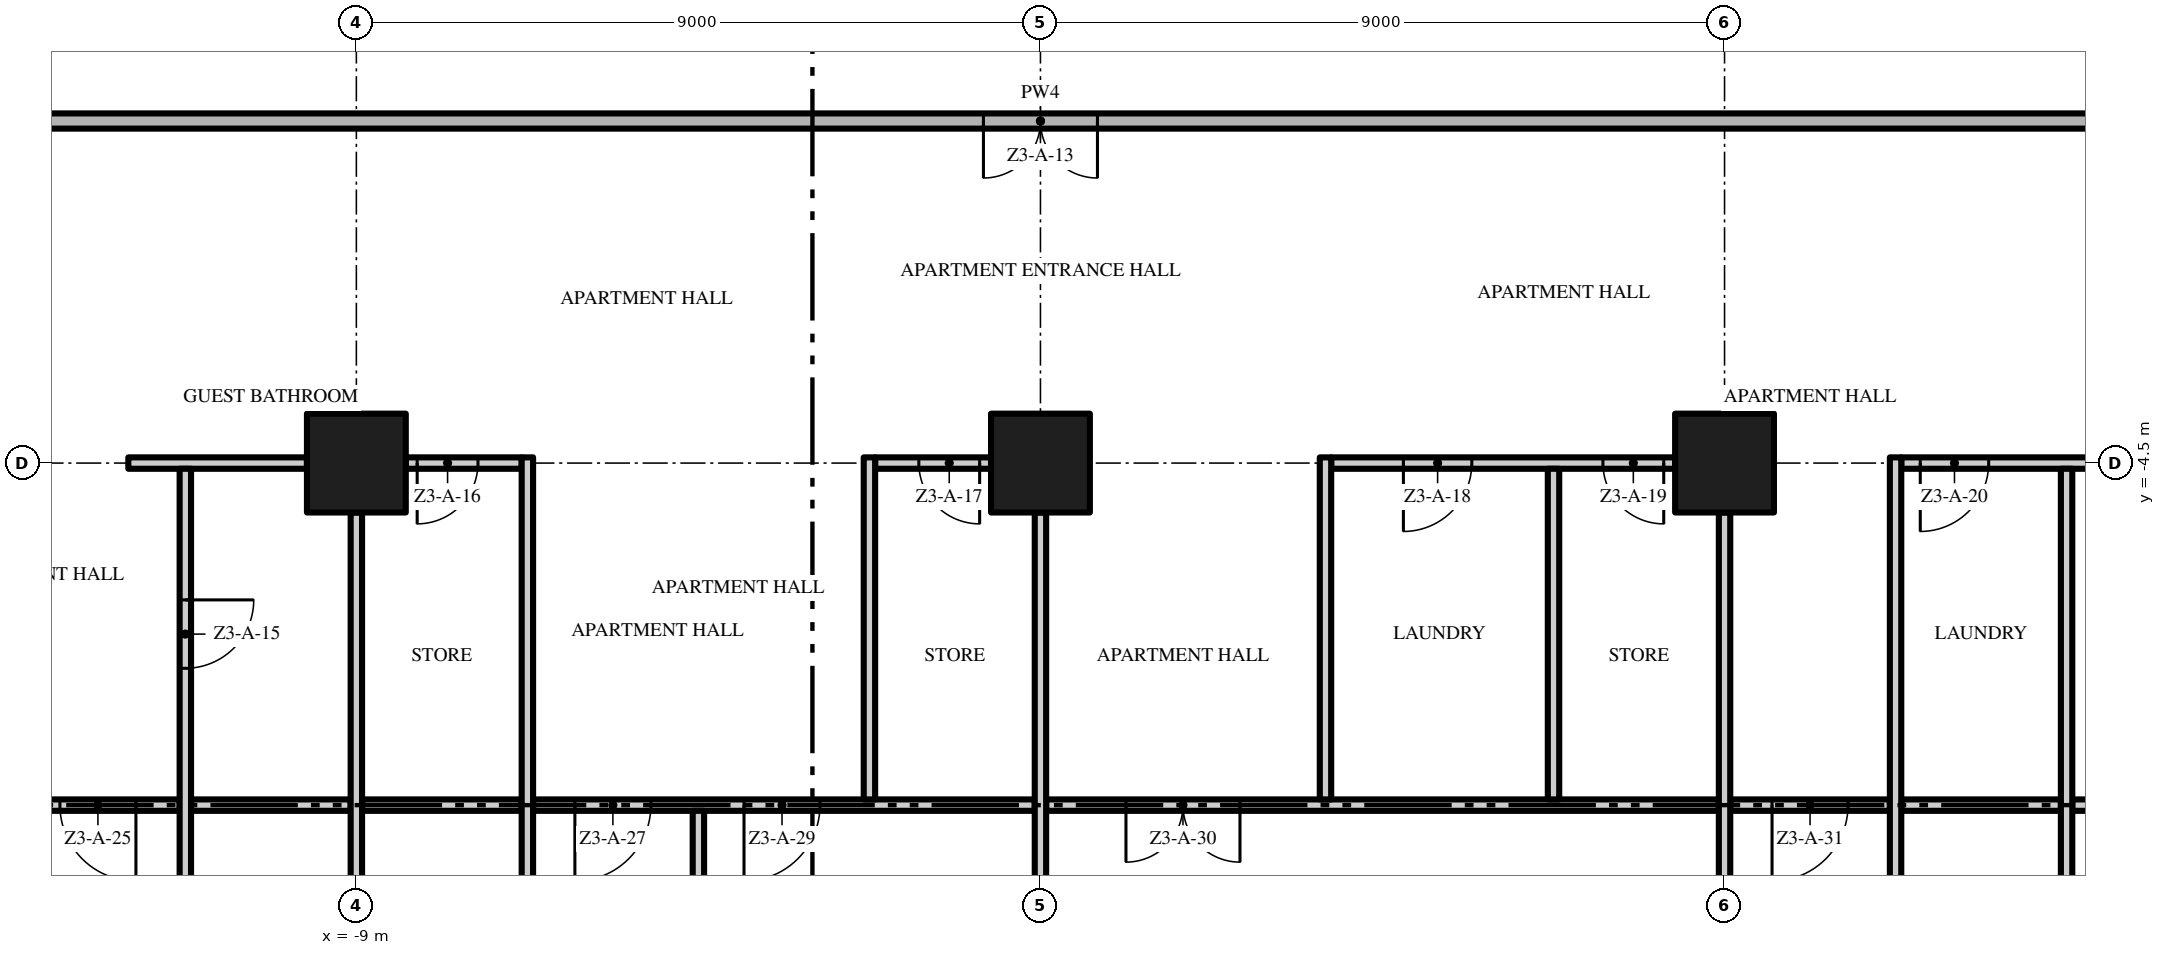
"""IFC4 building model, lengths in metres.
Left out: names, types, materials, properties, quantities, classifications, styles, units other than length and angle.
Written with IfcOpenShell. Run it as: python <this file> out.ifc"""

import sys

from ifc_helpers import new_model, si_unit, direction, frame, frame_2d, origin, origin_2d, place, context, subcontext, project, spatial, rectangle, extrude, element, fill, save


model = new_model("IFC4")
c1 = context("Model", 3, precision=1e-05, world=origin(), true_north=direction((0.0, 1.0)))
c2 = subcontext(c1, "Body", "Model", "MODEL_VIEW")
j1 = project(units=[si_unit("LENGTHUNIT", "METRE"), si_unit("PLANEANGLEUNIT", "RADIAN")], contexts=[c1])
p1 = place(None, origin())
s1 = spatial("IfcSite", under=j1, at=p1, CompositionType="ELEMENT")
p2 = place(p1, origin())
s2 = spatial("IfcBuilding", under=s1, at=p2, CompositionType="ELEMENT")
p3 = place(p2, frame((0.0, 0.0, 128.8)))
s3 = spatial("IfcBuildingStorey", under=s2, at=p3, CompositionType="ELEMENT", Elevation=128.8)
for number, where, z_axis, x_axis in (
    (1, (-9.0, -4.5, 0.0), (0.0, 0.0, 1.0), (1.0, 0.0, 0.0)),
    (2, (0.0, -4.5, 0.0), (0.0, 0.0, 1.0), (1.0, 0.0, 0.0)),
    (3, (9.0, -4.5, 0.0), (0.0, 0.0, 1.0), (1.0, 0.0, 0.0)),
):
    element("IfcColumn", number, at=place(p3, frame(where, z_axis=z_axis, x_axis=x_axis)), inside=s3, PredefinedType="COLUMN", context=c2, shape_type="SweptSolid", body=[
        extrude(rectangle(XDim=1.3, YDim=1.3, at=origin_2d()), origin(), (0.0, 0.0, 1.0), 3.5),
    ])
p4 = place(p3, frame((-11.325, -9.0, 0.0), z_axis=(0.0, 0.0, 1.0), x_axis=(-1.0, 0.0, 0.0)))
e4 = element("IfcWall", 4, at=p4, inside=s3, PredefinedType="PARTITIONING", context=c2, shape_type="SweptSolid", body=[
    extrude(rectangle(XDim=10.875, YDim=0.15, at=frame_2d((5.438, 0.0))), origin(), (0.0, 0.0, 1.0), 3.5),
])
p5 = place(p4, frame((3.175, 0.0, 0.0)))
e5 = element("IfcOpeningElement", 5, at=p5, cuts=e4, PredefinedType="OPENING", context=c2, shape_type="SweptSolid", body=[
    extrude(rectangle(XDim=1.8, YDim=2.4, at=frame_2d((0.9, 1.2))), frame((0.0, 0.085, 0.0), z_axis=(0.0, -1.0, 0.0), x_axis=(1.0, 0.0, 0.0)), (0.0, 0.0, 1.0), 0.17),
])
p6 = place(p4, frame((0.575, 0.0, 0.0)))
e6 = element("IfcOpeningElement", 6, at=p6, cuts=e4, PredefinedType="OPENING", context=c2, shape_type="SweptSolid", body=[
    extrude(rectangle(XDim=1.0, YDim=2.4, at=frame_2d((0.5, 1.2))), frame((0.0, 0.085, 0.0), z_axis=(0.0, -1.0, 0.0), x_axis=(1.0, 0.0, 0.0)), (0.0, 0.0, 1.0), 0.17),
])
for number, where, z_axis, x_axis in (
    (7, (-11.175, -9.0, 0.0), (0.0, 0.0, 1.0), (1.0, 0.0, 0.0)),
    (8, (-8.925, -9.0, 0.0), (0.0, 0.0, 1.0), (1.0, 0.0, 0.0)),
):
    element("IfcWall", number, at=place(p3, frame(where, z_axis=z_axis, x_axis=x_axis)), inside=s3, PredefinedType="PARTITIONING", context=c2, shape_type="SweptSolid", body=[
        extrude(rectangle(XDim=2.1, YDim=0.15, at=frame_2d((1.05, 0.0))), origin(), (0.0, 0.0, 1.0), 3.5),
    ])
p7 = place(p3, frame((-0.075, -9.0, 0.0), z_axis=(0.0, 0.0, 1.0), x_axis=(-1.0, 0.0, 0.0)))
e9 = element("IfcWall", 9, at=p7, inside=s3, PredefinedType="PARTITIONING", context=c2, shape_type="SweptSolid", body=[
    extrude(rectangle(XDim=6.6, YDim=0.15, at=frame_2d((3.3, 0.0))), origin(), (0.0, 0.0, 1.0), 3.5),
])
p8 = place(p7, frame((5.05, 0.0, 0.0)))
e10 = element("IfcOpeningElement", 10, at=p8, cuts=e9, PredefinedType="OPENING", context=c2, shape_type="SweptSolid", body=[
    extrude(rectangle(XDim=1.0, YDim=2.4, at=frame_2d((0.5, 1.2))), frame((0.0, 0.085, 0.0), z_axis=(0.0, -1.0, 0.0), x_axis=(1.0, 0.0, 0.0)), (0.0, 0.0, 1.0), 0.17),
])
p9 = place(p7, frame((2.825, 0.0, 0.0)))
e11 = element("IfcOpeningElement", 11, at=p9, cuts=e9, PredefinedType="OPENING", context=c2, shape_type="SweptSolid", body=[
    extrude(rectangle(XDim=1.0, YDim=2.4, at=frame_2d((0.5, 1.2))), frame((0.0, 0.085, 0.0), z_axis=(0.0, -1.0, 0.0), x_axis=(1.0, 0.0, 0.0)), (0.0, 0.0, 1.0), 0.17),
])
p10 = place(p3, frame((8.925, -9.0, 0.0), z_axis=(0.0, 0.0, 1.0), x_axis=(-1.0, 0.0, 0.0)))
e12 = element("IfcWall", 12, at=p10, inside=s3, PredefinedType="PARTITIONING", context=c2, shape_type="SweptSolid", body=[
    extrude(rectangle(XDim=8.85, YDim=0.15, at=frame_2d((4.425, 0.0))), origin(), (0.0, 0.0, 1.0), 3.5),
])
p11 = place(p10, frame((6.3, 0.0, 0.0)))
e13 = element("IfcOpeningElement", 13, at=p11, cuts=e12, PredefinedType="OPENING", context=c2, shape_type="SweptSolid", body=[
    extrude(rectangle(XDim=1.5, YDim=2.4, at=frame_2d((0.75, 1.2))), frame((0.0, 0.085, 0.0), z_axis=(0.0, -1.0, 0.0), x_axis=(1.0, 0.0, 0.0)), (0.0, 0.0, 1.0), 0.17),
])
p12 = place(p3, frame((11.175, -9.0, 0.0), z_axis=(0.0, 0.0, 1.0), x_axis=(-1.0, 0.0, 0.0)))
e14 = element("IfcWall", 14, at=p12, inside=s3, PredefinedType="PARTITIONING", context=c2, shape_type="SweptSolid", body=[
    extrude(rectangle(XDim=2.1, YDim=0.15, at=frame_2d((1.05, 0.0))), origin(), (0.0, 0.0, 1.0), 3.5),
])
p13 = place(p12, frame((0.55, 0.0, 0.0)))
e15 = element("IfcOpeningElement", 15, at=p13, cuts=e14, PredefinedType="OPENING", context=c2, shape_type="SweptSolid", body=[
    extrude(rectangle(XDim=1.0, YDim=2.4, at=frame_2d((0.5, 1.2))), frame((0.0, 0.085, 0.0), z_axis=(0.0, -1.0, 0.0), x_axis=(1.0, 0.0, 0.0)), (0.0, 0.0, 1.0), 0.17),
])
for number, where, z_axis, x_axis in (
    (16, (11.325, -9.0, 0.0), (0.0, 0.0, 1.0), (1.0, 0.0, 0.0)),
    (17, (13.575, -9.0, 0.0), (0.0, 0.0, 1.0), (1.0, 0.0, 0.0)),
):
    element("IfcWall", number, at=place(p3, frame(where, z_axis=z_axis, x_axis=x_axis)), inside=s3, PredefinedType="PARTITIONING", context=c2, shape_type="SweptSolid", body=[
        extrude(rectangle(XDim=2.1, YDim=0.15, at=frame_2d((1.05, 0.0))), origin(), (0.0, 0.0, 1.0), 3.5),
    ])
p14 = place(p3, frame((-12.0, -4.5, 0.0), z_axis=(0.0, 0.0, 1.0), x_axis=(1.0, 0.0, 0.0)))
e18 = element("IfcWall", 18, at=p14, inside=s3, PredefinedType="PARTITIONING", context=c2, shape_type="SweptSolid", body=[
    extrude(rectangle(XDim=2.35, YDim=0.15, at=frame_2d((1.175, 0.0))), origin(), (0.0, 0.0, 1.0), 3.5),
])
p15 = place(p3, frame((-6.825, -4.5, 0.0), z_axis=(0.0, 0.0, 1.0), x_axis=(-1.0, 0.0, 0.0)))
e19 = element("IfcWall", 19, at=p15, inside=s3, PredefinedType="PARTITIONING", context=c2, shape_type="SweptSolid", body=[
    extrude(rectangle(XDim=1.525, YDim=0.15, at=frame_2d((0.762, 0.0))), origin(), (0.0, 0.0, 1.0), 3.5),
])
p16 = place(p15, frame((0.575, 0.0, 0.0)))
e20 = element("IfcOpeningElement", 20, at=p16, cuts=e19, PredefinedType="OPENING", context=c2, shape_type="SweptSolid", body=[
    extrude(rectangle(XDim=0.8, YDim=2.0, at=frame_2d((0.4, 1.0))), frame((0.0, 0.085, 0.0), z_axis=(0.0, -1.0, 0.0), x_axis=(1.0, 0.0, 0.0)), (0.0, 0.0, 1.0), 0.17),
])
p17 = place(p3, frame((-0.65, -4.5, 0.0), z_axis=(0.0, 0.0, 1.0), x_axis=(-1.0, 0.0, 0.0)))
e21 = element("IfcWall", 21, at=p17, inside=s3, PredefinedType="PARTITIONING", context=c2, shape_type="SweptSolid", body=[
    extrude(rectangle(XDim=1.525, YDim=0.15, at=frame_2d((0.762, 0.0))), origin(), (0.0, 0.0, 1.0), 3.5),
])
p18 = place(p17, frame((0.15, 0.0, 0.0)))
e22 = element("IfcOpeningElement", 22, at=p18, cuts=e21, PredefinedType="OPENING", context=c2, shape_type="SweptSolid", body=[
    extrude(rectangle(XDim=0.8, YDim=2.0, at=frame_2d((0.4, 1.0))), frame((0.0, 0.085, 0.0), z_axis=(0.0, -1.0, 0.0), x_axis=(1.0, 0.0, 0.0)), (0.0, 0.0, 1.0), 0.17),
])
p19 = place(p3, frame((8.35, -4.5, 0.0), z_axis=(0.0, 0.0, 1.0), x_axis=(-1.0, 0.0, 0.0)))
e23 = element("IfcWall", 23, at=p19, inside=s3, PredefinedType="PARTITIONING", context=c2, shape_type="SweptSolid", body=[
    extrude(rectangle(XDim=4.525, YDim=0.15, at=frame_2d((2.263, 0.0))), origin(), (0.0, 0.0, 1.0), 3.5),
])
p20 = place(p19, frame((2.675, 0.0, 0.0)))
e24 = element("IfcOpeningElement", 24, at=p20, cuts=e23, PredefinedType="OPENING", context=c2, shape_type="SweptSolid", body=[
    extrude(rectangle(XDim=0.9, YDim=2.1, at=frame_2d((0.45, 1.05))), frame((0.0, 0.085, 0.0), z_axis=(0.0, -1.0, 0.0), x_axis=(1.0, 0.0, 0.0)), (0.0, 0.0, 1.0), 0.17),
])
p21 = place(p19, frame((0.15, 0.0, 0.0)))
e25 = element("IfcOpeningElement", 25, at=p21, cuts=e23, PredefinedType="OPENING", context=c2, shape_type="SweptSolid", body=[
    extrude(rectangle(XDim=0.8, YDim=2.0, at=frame_2d((0.4, 1.0))), frame((0.0, 0.085, 0.0), z_axis=(0.0, -1.0, 0.0), x_axis=(1.0, 0.0, 0.0)), (0.0, 0.0, 1.0), 0.17),
])
p22 = place(p3, frame((15.675, -4.5, 0.0), z_axis=(0.0, 0.0, 1.0), x_axis=(-1.0, 0.0, 0.0)))
e26 = element("IfcWall", 26, at=p22, inside=s3, PredefinedType="PARTITIONING", context=c2, shape_type="SweptSolid", body=[
    extrude(rectangle(XDim=4.35, YDim=0.15, at=frame_2d((2.175, 0.0))), origin(), (0.0, 0.0, 1.0), 3.5),
])
p23 = place(p22, frame((3.2, 0.0, 0.0)))
e27 = element("IfcOpeningElement", 27, at=p23, cuts=e26, PredefinedType="OPENING", context=c2, shape_type="SweptSolid", body=[
    extrude(rectangle(XDim=0.9, YDim=2.1, at=frame_2d((0.45, 1.05))), frame((0.0, 0.085, 0.0), z_axis=(0.0, -1.0, 0.0), x_axis=(1.0, 0.0, 0.0)), (0.0, 0.0, 1.0), 0.17),
])
p24 = place(p22, frame((0.675, 0.0, 0.0)))
e28 = element("IfcOpeningElement", 28, at=p24, cuts=e26, PredefinedType="OPENING", context=c2, shape_type="SweptSolid", body=[
    extrude(rectangle(XDim=0.8, YDim=2.0, at=frame_2d((0.4, 1.0))), frame((0.0, 0.085, 0.0), z_axis=(0.0, -1.0, 0.0), x_axis=(1.0, 0.0, 0.0)), (0.0, 0.0, 1.0), 0.17),
])
p25 = place(p3, frame((17.5, 0.0, 0.0), z_axis=(0.0, 0.0, 1.0), x_axis=(-1.0, 0.0, 0.0)))
e29 = element("IfcWall", 29, at=p25, inside=s3, PredefinedType="PARTITIONING", context=c2, shape_type="SweptSolid", body=[
    extrude(rectangle(XDim=35.0, YDim=0.2, at=frame_2d((17.5, 0.0))), origin(), (0.0, 0.0, 1.0), 3.5),
])
p26 = place(p25, frame((16.75, 0.0, 0.0)))
e30 = element("IfcOpeningElement", 30, at=p26, cuts=e29, PredefinedType="OPENING", context=c2, shape_type="SweptSolid", body=[
    extrude(rectangle(XDim=1.5, YDim=2.4, at=frame_2d((0.75, 1.2))), frame((0.0, 0.11, 0.0), z_axis=(0.0, -1.0, 0.0), x_axis=(1.0, 0.0, 0.0)), (0.0, 0.0, 1.0), 0.22),
])
p27 = place(p3, frame((-11.25, -4.575, 0.0), z_axis=(0.0, 0.0, 1.0), x_axis=(0.0, -1.0, 0.0)))
e31 = element("IfcWall", 31, at=p27, inside=s3, PredefinedType="PARTITIONING", context=c2, shape_type="SweptSolid", body=[
    extrude(rectangle(XDim=7.5, YDim=0.15, at=frame_2d((3.75, 0.0))), origin(), (0.0, 0.0, 1.0), 3.5),
])
p28 = place(p27, frame((1.725, 0.0, 0.0)))
e32 = element("IfcOpeningElement", 32, at=p28, cuts=e31, PredefinedType="OPENING", context=c2, shape_type="SweptSolid", body=[
    extrude(rectangle(XDim=0.9, YDim=2.1, at=frame_2d((0.45, 1.05))), frame((0.0, 0.085, 0.0), z_axis=(0.0, -1.0, 0.0), x_axis=(1.0, 0.0, 0.0)), (0.0, 0.0, 1.0), 0.17),
])
p29 = place(p3, frame((-9.0, -12.85, 0.0), z_axis=(0.0, 0.0, 1.0), x_axis=(0.0, 1.0, 0.0)))
e33 = element("IfcWall", 33, at=p29, inside=s3, PredefinedType="PARTITIONING", context=c2, shape_type="SweptSolid", body=[
    extrude(rectangle(XDim=7.7, YDim=0.15, at=frame_2d((3.85, 0.0))), origin(), (0.0, 0.0, 1.0), 3.5),
])
p30 = place(p3, frame((-6.75, -12.075, 0.0), z_axis=(0.0, 0.0, 1.0), x_axis=(0.0, 1.0, 0.0)))
e34 = element("IfcWall", 34, at=p30, inside=s3, PredefinedType="PARTITIONING", context=c2, shape_type="SweptSolid", body=[
    extrude(rectangle(XDim=7.65, YDim=0.15, at=frame_2d((3.825, 0.0))), origin(), (0.0, 0.0, 1.0), 3.5),
])
p31 = place(p3, frame((-4.5, -17.7, 0.0), z_axis=(0.0, 0.0, 1.0), x_axis=(0.0, 1.0, 0.0)))
e35 = element("IfcWall", 35, at=p31, inside=s3, PredefinedType="PARTITIONING", context=c2, shape_type="SweptSolid", body=[
    extrude(rectangle(XDim=8.625, YDim=0.15, at=frame_2d((4.312, 0.0))), origin(), (0.0, 0.0, 1.0), 3.5),
])
p32 = place(p3, frame((-2.25, -8.925, 0.0), z_axis=(0.0, 0.0, 1.0), x_axis=(0.0, 1.0, 0.0)))
e36 = element("IfcWall", 36, at=p32, inside=s3, PredefinedType="PARTITIONING", context=c2, shape_type="SweptSolid", body=[
    extrude(rectangle(XDim=4.5, YDim=0.15, at=frame_2d((2.25, 0.0))), origin(), (0.0, 0.0, 1.0), 3.5),
])
p33 = place(p3, frame((0.0, -12.85, 0.0), z_axis=(0.0, 0.0, 1.0), x_axis=(0.0, 1.0, 0.0)))
e37 = element("IfcWall", 37, at=p33, inside=s3, PredefinedType="PARTITIONING", context=c2, shape_type="SweptSolid", body=[
    extrude(rectangle(XDim=7.7, YDim=0.15, at=frame_2d((3.85, 0.0))), origin(), (0.0, 0.0, 1.0), 3.5),
])
p34 = place(p3, frame((3.75, -8.925, 0.0), z_axis=(0.0, 0.0, 1.0), x_axis=(0.0, 1.0, 0.0)))
e38 = element("IfcWall", 38, at=p34, inside=s3, PredefinedType="PARTITIONING", context=c2, shape_type="SweptSolid", body=[
    extrude(rectangle(XDim=4.5, YDim=0.15, at=frame_2d((2.25, 0.0))), origin(), (0.0, 0.0, 1.0), 3.5),
])
p35 = place(p3, frame((6.75, -8.925, 0.0), z_axis=(0.0, 0.0, 1.0), x_axis=(0.0, 1.0, 0.0)))
e39 = element("IfcWall", 39, at=p35, inside=s3, PredefinedType="PARTITIONING", context=c2, shape_type="SweptSolid", body=[
    extrude(rectangle(XDim=4.35, YDim=0.15, at=frame_2d((2.175, 0.0))), origin(), (0.0, 0.0, 1.0), 3.5),
])
p36 = place(p3, frame((9.0, -12.85, 0.0), z_axis=(0.0, 0.0, 1.0), x_axis=(0.0, 1.0, 0.0)))
e40 = element("IfcWall", 40, at=p36, inside=s3, PredefinedType="PARTITIONING", context=c2, shape_type="SweptSolid", body=[
    extrude(rectangle(XDim=7.7, YDim=0.15, at=frame_2d((3.85, 0.0))), origin(), (0.0, 0.0, 1.0), 3.5),
])
p37 = place(p3, frame((11.25, -12.075, 0.0), z_axis=(0.0, 0.0, 1.0), x_axis=(0.0, 1.0, 0.0)))
e41 = element("IfcWall", 41, at=p37, inside=s3, PredefinedType="PARTITIONING", context=c2, shape_type="SweptSolid", body=[
    extrude(rectangle(XDim=7.65, YDim=0.15, at=frame_2d((3.825, 0.0))), origin(), (0.0, 0.0, 1.0), 3.5),
])
p38 = place(p3, frame((13.5, -17.7, 0.0), z_axis=(0.0, 0.0, 1.0), x_axis=(0.0, 1.0, 0.0)))
e42 = element("IfcWall", 42, at=p38, inside=s3, PredefinedType="PARTITIONING", context=c2, shape_type="SweptSolid", body=[
    extrude(rectangle(XDim=13.125, YDim=0.15, at=frame_2d((6.562, 0.0))), origin(), (0.0, 0.0, 1.0), 3.5),
])
p39 = place(p26, origin())
e43 = element("IfcDoor", 43, at=p39, inside=s3, OperationType="DOUBLE_DOOR_SINGLE_SWING", PredefinedType="DOOR", context=c2, shape_type="SweptSolid", body=[
    extrude(rectangle(XDim=1.5, YDim=2.4, at=frame_2d((0.75, 1.2))), frame((0.0, 0.025, 0.0), z_axis=(0.0, -1.0, 0.0), x_axis=(1.0, 0.0, 0.0)), (0.0, 0.0, 1.0), 0.05),
])
fill(e30, e43)
p40 = place(p28, origin())
e44 = element("IfcDoor", 44, at=p40, inside=s3, OperationType="SINGLE_SWING_LEFT", PredefinedType="DOOR", context=c2, shape_type="SweptSolid", body=[
    extrude(rectangle(XDim=0.9, YDim=2.1, at=frame_2d((0.45, 1.05))), frame((0.0, 0.025, 0.0), z_axis=(0.0, -1.0, 0.0), x_axis=(1.0, 0.0, 0.0)), (0.0, 0.0, 1.0), 0.05),
])
fill(e32, e44)
p41 = place(p16, origin())
e45 = element("IfcDoor", 45, at=p41, inside=s3, OperationType="SINGLE_SWING_RIGHT", PredefinedType="DOOR", context=c2, shape_type="SweptSolid", body=[
    extrude(rectangle(XDim=0.8, YDim=2.0, at=frame_2d((0.4, 1.0))), frame((0.0, 0.025, 0.0), z_axis=(0.0, -1.0, 0.0), x_axis=(1.0, 0.0, 0.0)), (0.0, 0.0, 1.0), 0.05),
])
fill(e20, e45)
p42 = place(p18, origin())
e46 = element("IfcDoor", 46, at=p42, inside=s3, OperationType="SINGLE_SWING_LEFT", PredefinedType="DOOR", context=c2, shape_type="SweptSolid", body=[
    extrude(rectangle(XDim=0.8, YDim=2.0, at=frame_2d((0.4, 1.0))), frame((0.0, 0.025, 0.0), z_axis=(0.0, -1.0, 0.0), x_axis=(1.0, 0.0, 0.0)), (0.0, 0.0, 1.0), 0.05),
])
fill(e22, e46)
p43 = place(p20, origin())
e47 = element("IfcDoor", 47, at=p43, inside=s3, OperationType="SINGLE_SWING_RIGHT", PredefinedType="DOOR", context=c2, shape_type="SweptSolid", body=[
    extrude(rectangle(XDim=0.9, YDim=2.1, at=frame_2d((0.45, 1.05))), frame((0.0, 0.025, 0.0), z_axis=(0.0, -1.0, 0.0), x_axis=(1.0, 0.0, 0.0)), (0.0, 0.0, 1.0), 0.05),
])
fill(e24, e47)
p44 = place(p21, origin())
e48 = element("IfcDoor", 48, at=p44, inside=s3, OperationType="SINGLE_SWING_LEFT", PredefinedType="DOOR", context=c2, shape_type="SweptSolid", body=[
    extrude(rectangle(XDim=0.8, YDim=2.0, at=frame_2d((0.4, 1.0))), frame((0.0, 0.025, 0.0), z_axis=(0.0, -1.0, 0.0), x_axis=(1.0, 0.0, 0.0)), (0.0, 0.0, 1.0), 0.05),
])
fill(e25, e48)
p45 = place(p23, origin())
e49 = element("IfcDoor", 49, at=p45, inside=s3, OperationType="SINGLE_SWING_RIGHT", PredefinedType="DOOR", context=c2, shape_type="SweptSolid", body=[
    extrude(rectangle(XDim=0.9, YDim=2.1, at=frame_2d((0.45, 1.05))), frame((0.0, 0.025, 0.0), z_axis=(0.0, -1.0, 0.0), x_axis=(1.0, 0.0, 0.0)), (0.0, 0.0, 1.0), 0.05),
])
fill(e27, e49)
p46 = place(p6, origin())
e50 = element("IfcDoor", 50, at=p46, inside=s3, OperationType="SINGLE_SWING_LEFT", PredefinedType="DOOR", context=c2, shape_type="SweptSolid", body=[
    extrude(rectangle(XDim=1.0, YDim=2.4, at=frame_2d((0.5, 1.2))), frame((0.0, 0.025, 0.0), z_axis=(0.0, -1.0, 0.0), x_axis=(1.0, 0.0, 0.0)), (0.0, 0.0, 1.0), 0.05),
])
fill(e6, e50)
p47 = place(p8, origin())
e51 = element("IfcDoor", 51, at=p47, inside=s3, OperationType="SINGLE_SWING_RIGHT", PredefinedType="DOOR", context=c2, shape_type="SweptSolid", body=[
    extrude(rectangle(XDim=1.0, YDim=2.4, at=frame_2d((0.5, 1.2))), frame((0.0, 0.025, 0.0), z_axis=(0.0, -1.0, 0.0), x_axis=(1.0, 0.0, 0.0)), (0.0, 0.0, 1.0), 0.05),
])
fill(e10, e51)
p48 = place(p9, origin())
e52 = element("IfcDoor", 52, at=p48, inside=s3, OperationType="SINGLE_SWING_RIGHT", PredefinedType="DOOR", context=c2, shape_type="SweptSolid", body=[
    extrude(rectangle(XDim=1.0, YDim=2.4, at=frame_2d((0.5, 1.2))), frame((0.0, 0.025, 0.0), z_axis=(0.0, -1.0, 0.0), x_axis=(1.0, 0.0, 0.0)), (0.0, 0.0, 1.0), 0.05),
])
fill(e11, e52)
p49 = place(p11, origin())
e53 = element("IfcDoor", 53, at=p49, inside=s3, OperationType="DOUBLE_DOOR_SINGLE_SWING", PredefinedType="DOOR", context=c2, shape_type="SweptSolid", body=[
    extrude(rectangle(XDim=1.5, YDim=2.4, at=frame_2d((0.75, 1.2))), frame((0.0, 0.025, 0.0), z_axis=(0.0, -1.0, 0.0), x_axis=(1.0, 0.0, 0.0)), (0.0, 0.0, 1.0), 0.05),
])
fill(e13, e53)
p50 = place(p13, origin())
e54 = element("IfcDoor", 54, at=p50, inside=s3, OperationType="SINGLE_SWING_RIGHT", PredefinedType="DOOR", context=c2, shape_type="SweptSolid", body=[
    extrude(rectangle(XDim=1.0, YDim=2.4, at=frame_2d((0.5, 1.2))), frame((0.0, 0.025, 0.0), z_axis=(0.0, -1.0, 0.0), x_axis=(1.0, 0.0, 0.0)), (0.0, 0.0, 1.0), 0.05),
])
fill(e15, e54)
save(model, sys.argv[1])
